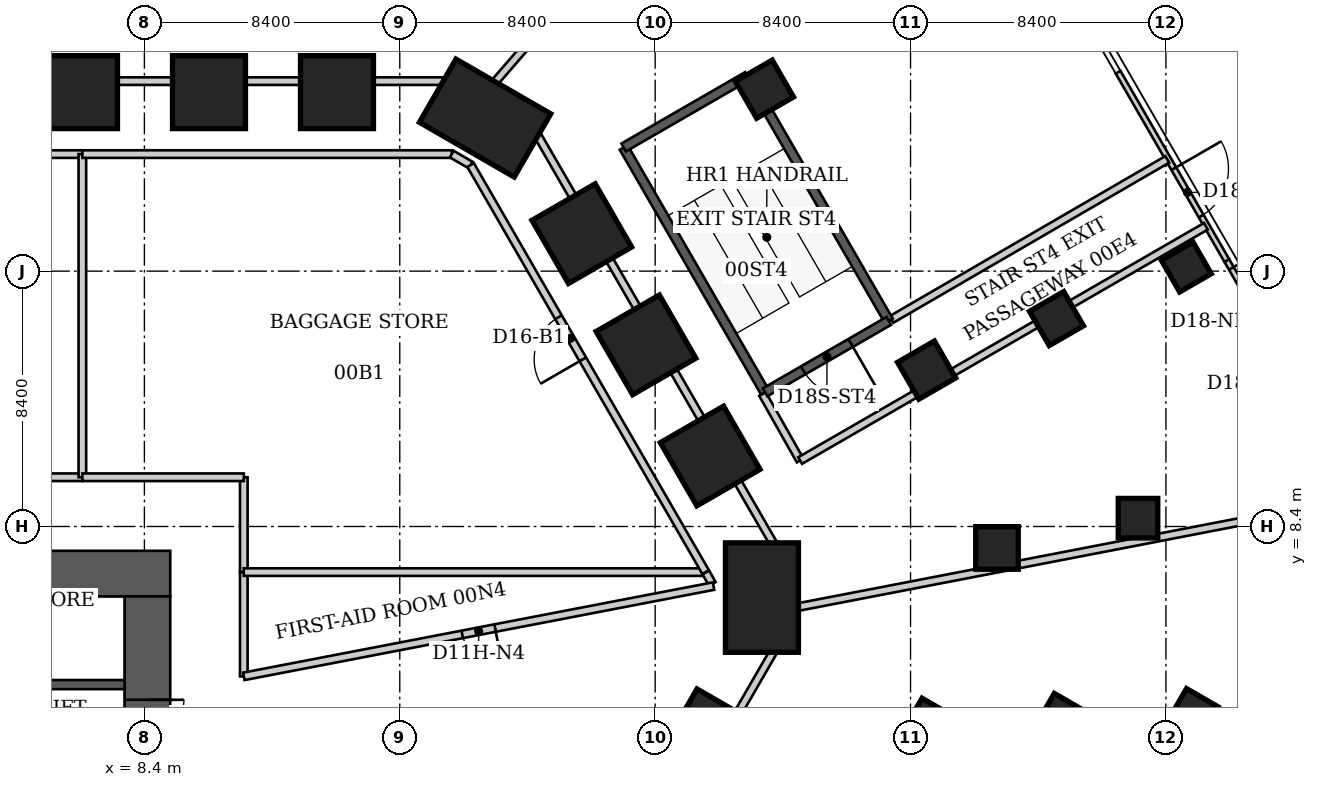
"""IFC4 building model, lengths in metres.
Left out: names, types, materials, properties, quantities, classifications, styles, units other than length and angle.
Written with IfcOpenShell. Run it as: python <this file> out.ifc"""

import sys

from ifc_helpers import new_model, si_unit, direction, frame, frame_2d, origin, origin_2d, place, context, subcontext, project, spatial, rectangle, extrude, element, fill, save


model = new_model("IFC4")
c1 = context("Model", 3, precision=1e-05, world=origin(), true_north=direction((0.0, 1.0)))
c2 = subcontext(c1, "Body", "Model", "MODEL_VIEW")
j1 = project(units=[si_unit("LENGTHUNIT", "METRE"), si_unit("PLANEANGLEUNIT", "RADIAN")], contexts=[c1])
p1 = place(None, origin())
s1 = spatial("IfcSite", under=j1, at=p1, CompositionType="ELEMENT")
p2 = place(p1, origin())
s2 = spatial("IfcBuilding", under=s1, at=p2, CompositionType="ELEMENT")
p3 = place(p2, origin())
s3 = spatial("IfcBuildingStorey", under=s2, at=p3, CompositionType="ELEMENT", Elevation=0.0)
for number, where, z_axis, x_axis in (
    (1, (6.315, 22.689, -0.2), (0.0, 0.0, 1.0), (0.0, 1.0, 0.0)),
    (2, (10.525, 22.689, -0.2), (0.0, 0.0, 1.0), (0.0, 1.0, 0.0)),
    (3, (14.735, 22.689, -0.2), (0.0, 0.0, 1.0), (0.0, 1.0, 0.0)),
):
    element("IfcColumn", number, at=place(p3, frame(where, z_axis=z_axis, x_axis=x_axis)), inside=s3, PredefinedType="COLUMN", context=c2, shape_type="SweptSolid", body=[
        extrude(rectangle(XDim=2.4, YDim=2.4, at=origin_2d()), origin(), (0.0, 0.0, 1.0), 6.2),
    ])
p4 = place(p3, frame((19.606, 21.835, -0.2), z_axis=(0.0, 0.0, 1.0), x_axis=(0.5, 0.866025403784, 0.0)))
e4 = element("IfcColumn", 4, at=p4, inside=s3, PredefinedType="COLUMN", context=c2, shape_type="SweptSolid", body=[
    extrude(rectangle(XDim=2.4, YDim=3.6, at=origin_2d()), origin(), (0.0, 0.0, 1.0), 6.2),
])
for number, where, z_axis, x_axis in (
    (5, (22.788, 18.032, -0.2), (0.0, 0.0, 1.0), (0.866, 0.5, 0.0)),
    (6, (24.899, 14.375, -0.2), (0.0, 0.0, 1.0), (0.866, 0.5, 0.0)),
    (7, (27.01, 10.719, -0.2), (0.0, 0.0, 1.0), (0.866, 0.5, 0.0)),
):
    element("IfcColumn", number, at=place(p3, frame(where, z_axis=z_axis, x_axis=x_axis)), inside=s3, PredefinedType="COLUMN", context=c2, shape_type="SweptSolid", body=[
        extrude(rectangle(XDim=2.4, YDim=2.4, at=origin_2d()), origin(), (0.0, 0.0, 1.0), 6.2),
    ])
p5 = place(p3, frame((28.713, 6.062, -0.2), z_axis=(0.0, 0.0, 1.0), x_axis=(1.0, 0.0, 0.0)))
e8 = element("IfcColumn", 8, at=p5, inside=s3, PredefinedType="COLUMN", context=c2, shape_type="SweptSolid", body=[
    extrude(rectangle(XDim=2.4, YDim=3.6, at=origin_2d()), origin(), (0.0, 0.0, 1.0), 6.2),
])
p6 = place(p3, frame((27.016, 1.416, -0.2), z_axis=(0.0, 0.0, 1.0), x_axis=(0.866025403784, -0.5, 0.0)))
e9 = element("IfcColumn", 9, at=p6, inside=s3, PredefinedType="COLUMN", context=c2, shape_type="SweptSolid", body=[
    extrude(rectangle(XDim=2.4, YDim=2.4, at=origin_2d()), origin(), (0.0, 0.0, 1.0), 6.2),
])
for number, where, z_axis, x_axis in (
    (10, (28.794, 22.785, -0.2), (0.0, 0.0, 1.0), (0.866, 0.5, 0.0)),
    (11, (34.129, 13.544, -0.2), (0.0, 0.0, 1.0), (0.866, 0.5, 0.0)),
    (12, (36.443, 7.694, -0.2), (0.0, 0.0, 1.0), (1.0, 0.0, 0.0)),
    (13, (34.235, 1.795, -0.2), (0.0, 0.0, 1.0), (0.866, -0.5, 0.0)),
):
    element("IfcColumn", number, at=place(p3, frame(where, z_axis=z_axis, x_axis=x_axis)), inside=s3, PredefinedType="COLUMN", context=c2, shape_type="SweptSolid", body=[
        extrude(rectangle(XDim=1.4, YDim=1.4, at=origin_2d()), origin(), (0.0, 0.0, 1.0), 6.2),
    ])
for number, where, z_axis, x_axis in (
    (14, (38.4, 15.239, -0.2), (0.0, 0.0, 1.0), (0.866, 0.5, 0.0)),
    (15, (41.082, 8.674, -0.2), (0.0, 0.0, 1.0), (1.0, 0.0, 0.0)),
    (16, (38.566, 2.022, -0.2), (0.0, 0.0, 1.0), (0.866, -0.5, 0.0)),
):
    element("IfcColumn", number, at=place(p3, frame(where, z_axis=z_axis, x_axis=x_axis)), inside=s3, PredefinedType="COLUMN", context=c2, shape_type="SweptSolid", body=[
        extrude(rectangle(XDim=1.3, YDim=1.3, at=origin_2d()), origin(), (0.0, 0.0, 1.0), 6.2),
    ])
for number, where, z_axis, x_axis in (
    (17, (42.672, 16.934, -0.2), (0.0, 0.0, 1.0), (0.866, 0.5, 0.0)),
    (18, (42.897, 2.249, -0.2), (0.0, 0.0, 1.0), (0.866, -0.5, 0.0)),
):
    element("IfcColumn", number, at=place(p3, frame(where, z_axis=z_axis, x_axis=x_axis)), inside=s3, PredefinedType="COLUMN", context=c2, shape_type="SweptSolid", body=[
        extrude(rectangle(XDim=1.2, YDim=1.2, at=origin_2d()), origin(), (0.0, 0.0, 1.0), 6.2),
    ])
p7 = place(p3, frame((-9.25, 6.85, -0.2), z_axis=(0.0, 0.0, 1.0), x_axis=(1.0, 0.0, 0.0)))
e19 = element("IfcWall", 19, at=p7, inside=s3, PredefinedType="SHEAR", context=c2, shape_type="SweptSolid", body=[
    extrude(rectangle(XDim=18.5, YDim=1.5, at=frame_2d((9.25, 0.0))), origin(), (0.0, 0.0, 1.0), 6.2),
])
p8 = place(p7, frame((2.137, 0.0, 0.2)))
e20 = element("IfcOpeningElement", 20, at=p8, cuts=e19, PredefinedType="OPENING", context=c2, shape_type="SweptSolid", body=[
    extrude(rectangle(XDim=1.1, YDim=2.1, at=frame_2d((0.55, 1.05))), frame((0.0, 0.75, 0.0), z_axis=(0.0, -1.0, 0.0), x_axis=(1.0, 0.0, 0.0)), (0.0, 0.0, 1.0), 1.5),
])
p9 = place(p7, frame((4.762, 0.0, 0.2)))
e21 = element("IfcOpeningElement", 21, at=p9, cuts=e19, PredefinedType="OPENING", context=c2, shape_type="SweptSolid", body=[
    extrude(rectangle(XDim=1.1, YDim=2.1, at=frame_2d((0.55, 1.05))), frame((0.0, 0.75, 0.0), z_axis=(0.0, -1.0, 0.0), x_axis=(1.0, 0.0, 0.0)), (0.0, 0.0, 1.0), 1.5),
])
p10 = place(p3, frame((8.5, -9.2, -0.2), z_axis=(0.0, 0.0, 1.0), x_axis=(0.0, 1.0, 0.0)))
e22 = element("IfcWall", 22, at=p10, inside=s3, PredefinedType="SHEAR", context=c2, shape_type="SweptSolid", body=[
    extrude(rectangle(XDim=15.3, YDim=1.5, at=frame_2d((7.65, 0.0))), origin(), (0.0, 0.0, 1.0), 6.2),
])
p11 = place(p10, frame((10.7, 0.0, 0.2)))
e23 = element("IfcOpeningElement", 23, at=p11, cuts=e22, PredefinedType="OPENING", context=c2, shape_type="SweptSolid", body=[
    extrude(rectangle(XDim=1.2, YDim=2.2, at=frame_2d((0.6, 1.1))), frame((0.0, 0.75, 0.0), z_axis=(0.0, -1.0, 0.0), x_axis=(1.0, 0.0, 0.0)), (0.0, 0.0, 1.0), 1.5),
])
p12 = place(p3, frame((-7.75, 3.2, -0.2), z_axis=(0.0, 0.0, 1.0), x_axis=(1.0, 0.0, 0.0)))
e24 = element("IfcWall", 24, at=p12, inside=s3, PredefinedType="SHEAR", context=c2, shape_type="SweptSolid", body=[
    extrude(rectangle(XDim=15.5, YDim=0.3, at=frame_2d((7.75, 0.0))), origin(), (0.0, 0.0, 1.0), 6.2),
])
p13 = place(p12, frame((9.825, 0.0, 0.2)))
e25 = element("IfcOpeningElement", 25, at=p13, cuts=e24, PredefinedType="OPENING", context=c2, shape_type="SweptSolid", body=[
    extrude(rectangle(XDim=1.1, YDim=2.2, at=frame_2d((0.55, 1.1))), frame((0.0, 0.15, 0.0), z_axis=(0.0, -1.0, 0.0), x_axis=(1.0, 0.0, 0.0)), (0.0, 0.0, 1.0), 0.3),
])
p14 = place(p3, frame((40.428, 23.341, 0.0), z_axis=(0.0, 0.0, 1.0), x_axis=(0.499988249127, -0.866032188048, 0.0)))
e26 = element("IfcWall", 26, at=p14, inside=s3, PredefinedType="SOLIDWALL", context=c2, shape_type="SweptSolid", body=[
    extrude(rectangle(XDim=7.156, YDim=0.18, at=frame_2d((3.578, 0.0))), origin(), (0.0, 0.0, 1.0), 5.84),
])
p15 = place(p14, frame((3.661, 0.0, 0.0)))
e27 = element("IfcOpeningElement", 27, at=p15, cuts=e26, PredefinedType="OPENING", context=c2, shape_type="SweptSolid", body=[
    extrude(rectangle(XDim=1.8, YDim=2.7, at=frame_2d((0.9, 1.35))), frame((0.0, 0.09, 0.0), z_axis=(0.0, -1.0, 0.0), x_axis=(1.0, 0.0, 0.0)), (0.0, 0.0, 1.0), 0.18),
])
p16 = place(p3, frame((44.006, 17.144, 0.0), z_axis=(0.0, 0.0, 1.0), x_axis=(0.500013836808, -0.866017414952, 0.0)))
e28 = element("IfcWall", 28, at=p16, inside=s3, PredefinedType="SOLIDWALL", context=c2, shape_type="SweptSolid", body=[
    extrude(rectangle(XDim=7.156, YDim=0.18, at=frame_2d((3.578, 0.0))), origin(), (0.0, 0.0, 1.0), 5.84),
])
p17 = place(p16, frame((0.293, 0.0, 0.0)))
e29 = element("IfcOpeningElement", 29, at=p17, cuts=e28, PredefinedType="OPENING", context=c2, shape_type="SweptSolid", body=[
    extrude(rectangle(XDim=1.8, YDim=2.7, at=frame_2d((0.9, 1.35))), frame((0.0, 0.09, 0.0), z_axis=(0.0, -1.0, 0.0), x_axis=(1.0, 0.0, 0.0)), (0.0, 0.0, 1.0), 0.18),
])
p18 = place(p16, frame((2.678, 0.0, 0.0)))
e30 = element("IfcOpeningElement", 30, at=p18, cuts=e28, PredefinedType="OPENING", context=c2, shape_type="SweptSolid", body=[
    extrude(rectangle(XDim=1.8, YDim=2.7, at=frame_2d((0.9, 1.35))), frame((0.0, 0.09, 0.0), z_axis=(0.0, -1.0, 0.0), x_axis=(1.0, 0.0, 0.0)), (0.0, 0.0, 1.0), 0.18),
])
p19 = place(p16, frame((5.063, 0.0, 0.0)))
e31 = element("IfcOpeningElement", 31, at=p19, cuts=e28, PredefinedType="OPENING", context=c2, shape_type="SweptSolid", body=[
    extrude(rectangle(XDim=1.8, YDim=2.7, at=frame_2d((0.9, 1.35))), frame((0.0, 0.09, 0.0), z_axis=(0.0, -1.0, 0.0), x_axis=(1.0, 0.0, 0.0)), (0.0, 0.0, 1.0), 0.18),
])
p20 = place(p3, frame((4.0, 20.65, 0.0), z_axis=(0.0, 0.0, 1.0), x_axis=(1.0, 0.0, 0.0)))
e32 = element("IfcWall", 32, at=p20, inside=s3, PredefinedType="PARTITIONING", context=c2, shape_type="SweptSolid", body=[
    extrude(rectangle(XDim=2.36, YDim=0.25, at=frame_2d((1.18, 0.0))), origin(), (0.0, 0.0, 1.0), 5.84),
])
p21 = place(p3, frame((6.36, 10.02, 0.0), z_axis=(0.0, 0.0, 1.0), x_axis=(-1.0, 0.0, 0.0)))
e33 = element("IfcWall", 33, at=p21, inside=s3, PredefinedType="PARTITIONING", context=c2, shape_type="SweptSolid", body=[
    extrude(rectangle(XDim=13.45, YDim=0.25, at=frame_2d((6.725, 0.0))), origin(), (0.0, 0.0, 1.0), 5.84),
])
p22 = place(p3, frame((6.36, 10.02, 0.0), z_axis=(0.0, 0.0, 1.0), x_axis=(0.0, 1.0, 0.0)))
e34 = element("IfcWall", 34, at=p22, inside=s3, PredefinedType="PARTITIONING", context=c2, shape_type="SweptSolid", body=[
    extrude(rectangle(XDim=10.63, YDim=0.25, at=frame_2d((5.315, 0.0))), origin(), (0.0, 0.0, 1.0), 5.078),
])
p23 = place(p3, frame((6.36, 20.65, 0.0), z_axis=(0.0, 0.0, 1.0), x_axis=(1.0, 0.0, 0.0)))
e35 = element("IfcWall", 35, at=p23, inside=s3, PredefinedType="PARTITIONING", context=c2, shape_type="SweptSolid", body=[
    extrude(rectangle(XDim=12.15, YDim=0.25, at=frame_2d((6.075, 0.0))), origin(), (0.0, 0.0, 1.0), 5.84),
])
p24 = place(p3, frame((11.67, 3.47, 0.0), z_axis=(0.0, 0.0, 1.0), x_axis=(0.0, 1.0, 0.0)))
e36 = element("IfcWall", 36, at=p24, inside=s3, PredefinedType="PARTITIONING", context=c2, shape_type="SweptSolid", body=[
    extrude(rectangle(XDim=3.43, YDim=0.25, at=frame_2d((1.715, 0.0))), origin(), (0.0, 0.0, 1.0), 5.84),
])
p25 = place(p3, frame((11.67, 6.9, 0.0), z_axis=(0.0, 0.0, 1.0), x_axis=(0.0, 1.0, 0.0)))
e37 = element("IfcWall", 37, at=p25, inside=s3, PredefinedType="PARTITIONING", context=c2, shape_type="SweptSolid", body=[
    extrude(rectangle(XDim=3.12, YDim=0.25, at=frame_2d((1.56, 0.0))), origin(), (0.0, 0.0, 1.0), 5.84),
])
p26 = place(p3, frame((11.67, 10.02, 0.0), z_axis=(0.0, 0.0, 1.0), x_axis=(-1.0, 0.0, 0.0)))
e38 = element("IfcWall", 38, at=p26, inside=s3, PredefinedType="PARTITIONING", context=c2, shape_type="SweptSolid", body=[
    extrude(rectangle(XDim=5.31, YDim=0.25, at=frame_2d((2.655, 0.0))), origin(), (0.0, 0.0, 1.0), 5.84),
])
p27 = place(p3, frame((18.51, 20.65, 0.0), z_axis=(0.0, 0.0, 1.0), x_axis=(0.864827114446, -0.502069778138, 0.0)))
e39 = element("IfcWall", 39, at=p27, inside=s3, PredefinedType="PARTITIONING", context=c2, shape_type="SweptSolid", body=[
    extrude(rectangle(XDim=0.717, YDim=0.25, at=frame_2d((0.358, 0.0))), origin(), (0.0, 0.0, 1.0), 5.84),
])
p28 = place(p3, frame((19.15, 23.05, 0.0), z_axis=(0.0, 0.0, 1.0), x_axis=(-1.0, 0.0, 0.0)))
e40 = element("IfcWall", 40, at=p28, inside=s3, PredefinedType="PARTITIONING", context=c2, shape_type="SweptSolid", body=[
    extrude(rectangle(XDim=15.15, YDim=0.25, at=frame_2d((7.575, 0.0))), origin(), (0.0, 0.0, 1.0), 4.04),
])
p29 = place(p3, frame((19.15, 23.05, 0.0), z_axis=(0.0, 0.0, 1.0), x_axis=(0.86570107998, -0.500561325036, 0.0)))
e41 = element("IfcWall", 41, at=p29, inside=s3, PredefinedType="PARTITIONING", context=c2, shape_type="SweptSolid", body=[
    extrude(rectangle(XDim=0.588, YDim=0.25, at=frame_2d((0.294, 0.0))), origin(), (0.0, 0.0, 1.0), 5.84),
])
p30 = place(p3, frame((19.69, 22.74, 0.0), z_axis=(0.0, 0.0, 1.0), x_axis=(0.865102050426, -0.501595895466, 0.0)))
e42 = element("IfcWall", 42, at=p30, inside=s3, PredefinedType="PARTITIONING", context=c2, shape_type="SweptSolid", body=[
    extrude(rectangle(XDim=1.375, YDim=0.25, at=frame_2d((0.688, 0.0))), origin(), (0.0, 0.0, 1.0), 5.84),
])
p31 = place(p3, frame((25.06, -2.69, 0.0), z_axis=(0.0, 0.0, 1.0), x_axis=(0.500462066422, 0.865758465204, 0.0)))
e43 = element("IfcWall", 43, at=p31, inside=s3, PredefinedType="PARTITIONING", context=c2, shape_type="SweptSolid", body=[
    extrude(rectangle(XDim=8.952, YDim=0.25, at=frame_2d((4.476, 0.0))), origin(), (0.0, 0.0, 1.0), 4.04),
])
p32 = place(p3, frame((26.85, 6.9, 0.0), z_axis=(0.0, 0.0, 1.0), x_axis=(-1.0, 0.0, 0.0)))
e44 = element("IfcWall", 44, at=p32, inside=s3, PredefinedType="PARTITIONING", context=c2, shape_type="SweptSolid", body=[
    extrude(rectangle(XDim=15.18, YDim=0.25, at=frame_2d((7.59, 0.0))), origin(), (0.0, 0.0, 1.0), 5.84),
])
p33 = place(p3, frame((26.86, 6.9, 0.0), z_axis=(0.0, 0.0, 1.0), x_axis=(-0.499972135205, 0.866041490934, 0.0)))
e45 = element("IfcWall", 45, at=p33, inside=s3, PredefinedType="PARTITIONING", context=c2, shape_type="SweptSolid", body=[
    extrude(rectangle(XDim=15.461, YDim=0.25, at=frame_2d((7.731, 0.0))), origin(), (0.0, 0.0, 1.0), 5.84),
])
p34 = place(p33, frame((8.081, 0.0, 0.0)))
e46 = element("IfcOpeningElement", 46, at=p34, cuts=e45, PredefinedType="OPENING", context=c2, shape_type="SweptSolid", body=[
    extrude(rectangle(XDim=1.6, YDim=2.4, at=frame_2d((0.8, 1.2))), frame((0.0, 0.125, 0.0), z_axis=(0.0, -1.0, 0.0), x_axis=(1.0, 0.0, 0.0)), (0.0, 0.0, 1.0), 0.25),
])
p35 = place(p3, frame((26.867, 6.887, 0.0), z_axis=(0.0, 0.0, 1.0), x_axis=(0.49170458892, -0.870762078432, 0.0)))
e47 = element("IfcWall", 47, at=p35, inside=s3, PredefinedType="PARTITIONING", context=c2, shape_type="SweptSolid", body=[
    extrude(rectangle(XDim=0.433, YDim=0.25, at=frame_2d((0.217, 0.0))), origin(), (0.0, 0.0, 1.0), 5.84),
])
p36 = place(p3, frame((27.12, 6.44, 0.0), z_axis=(0.0, 0.0, 1.0), x_axis=(-0.982020832849, -0.188772571765, 0.0)))
e48 = element("IfcWall", 48, at=p36, inside=s3, PredefinedType="PARTITIONING", context=c2, shape_type="SweptSolid", body=[
    extrude(rectangle(XDim=15.733, YDim=0.25, at=frame_2d((7.867, 0.0))), origin(), (0.0, 0.0, 1.0), 5.84),
])
p37 = place(p36, frame((7.316, 0.0, 0.0)))
e49 = element("IfcOpeningElement", 49, at=p37, cuts=e48, PredefinedType="OPENING", context=c2, shape_type="SweptSolid", body=[
    extrude(rectangle(XDim=1.1, YDim=2.2, at=frame_2d((0.55, 1.1))), frame((0.0, 0.125, 0.0), z_axis=(0.0, -1.0, 0.0), x_axis=(1.0, 0.0, 0.0)), (0.0, 0.0, 1.0), 0.25),
])
p38 = place(p3, frame((28.73, 12.76, 0.0), z_axis=(0.0, 0.0, 1.0), x_axis=(0.492718818431, -0.87018858069, 0.0)))
e50 = element("IfcWall", 50, at=p38, inside=s3, PredefinedType="PARTITIONING", context=c2, shape_type="SweptSolid", body=[
    extrude(rectangle(XDim=2.517, YDim=0.25, at=frame_2d((1.258, 0.0))), origin(), (0.0, 0.0, 1.0), 5.84),
])
p39 = place(p3, frame((29.54, 5.06, 0.0), z_axis=(0.0, 0.0, 1.0), x_axis=(0.0, 1.0, 0.0)))
e51 = element("IfcWall", 51, at=p39, inside=s3, PredefinedType="PARTITIONING", context=c2, shape_type="SweptSolid", body=[
    extrude(rectangle(XDim=0.585, YDim=0.25, at=frame_2d((0.292, 0.0))), origin(), (0.0, 0.0, 1.0), 5.84),
])
p40 = place(p3, frame((29.54, 5.68, 0.0), z_axis=(0.0, 0.0, 1.0), x_axis=(0.0, 1.0, 0.0)))
e52 = element("IfcWall", 52, at=p40, inside=s3, PredefinedType="PARTITIONING", context=c2, shape_type="SweptSolid", body=[
    extrude(rectangle(XDim=1.38, YDim=0.25, at=frame_2d((0.69, 0.0))), origin(), (0.0, 0.0, 1.0), 5.84),
])
p41 = place(p3, frame((29.54, 7.06, 0.0), z_axis=(0.0, 0.0, 1.0), x_axis=(-0.500235539918, 0.865889372035, 0.0)))
e53 = element("IfcWall", 53, at=p41, inside=s3, PredefinedType="PARTITIONING", context=c2, shape_type="SweptSolid", body=[
    extrude(rectangle(XDim=17.312, YDim=0.25, at=frame_2d((8.656, 0.0))), origin(), (0.0, 0.0, 1.0), 4.04),
])
p42 = place(p3, frame((29.97, 10.57, 0.0), z_axis=(0.0, 0.0, 1.0), x_axis=(0.866006423824, 0.500032872815, 0.0)))
e54 = element("IfcWall", 54, at=p42, inside=s3, PredefinedType="PARTITIONING", context=c2, shape_type="SweptSolid", body=[
    extrude(rectangle(XDim=15.409, YDim=0.25, at=frame_2d((7.704, 0.0))), origin(), (0.0, 0.0, 1.0), 5.083),
])
p43 = place(p3, frame((31.73, 36.647, 0.0), z_axis=(0.0, 0.0, 1.0), x_axis=(-0.654545432473, -0.75602266952, 0.0)))
e55 = element("IfcWall", 55, at=p43, inside=s3, PredefinedType="PARTITIONING", context=c2, shape_type="SweptSolid", body=[
    extrude(rectangle(XDim=18.395, YDim=0.25, at=frame_2d((9.198, 0.0))), origin(), (0.0, 0.0, 1.0), 5.75),
])
p44 = place(p43, frame((8.398, 0.0, 0.0)))
e56 = element("IfcOpeningElement", 56, at=p44, cuts=e55, PredefinedType="OPENING", context=c2, shape_type="SweptSolid", body=[
    extrude(rectangle(XDim=1.6, YDim=2.4, at=frame_2d((0.8, 1.2))), frame((0.0, 0.125, 0.0), z_axis=(0.0, -1.0, 0.0), x_axis=(1.0, 0.0, 0.0)), (0.0, 0.0, 1.0), 0.25),
])
p45 = place(p3, frame((42.044, 20.475, 0.0), z_axis=(0.0, 0.0, 1.0), x_axis=(-0.864887716018, -0.501965375978, 0.0)))
e57 = element("IfcWall", 57, at=p45, inside=s3, PredefinedType="PARTITIONING", context=c2, shape_type="SweptSolid", body=[
    extrude(rectangle(XDim=10.49, YDim=0.25, at=frame_2d((5.245, 0.0))), origin(), (0.0, 0.0, 1.0), 5.75),
])
p46 = place(p3, frame((47.601, 9.164, 0.0), z_axis=(0.0, 0.0, 1.0), x_axis=(-0.981893421599, -0.189434180181, 0.0)))
e58 = element("IfcWall", 58, at=p46, inside=s3, PredefinedType="PARTITIONING", context=c2, shape_type="SweptSolid", body=[
    extrude(rectangle(XDim=18.394, YDim=0.25, at=frame_2d((9.197, 0.0))), origin(), (0.0, 0.0, 1.0), 5.75),
])
p47 = place(p3, frame((28.815, 12.813, 0.0), z_axis=(0.0, 0.0, 1.0), x_axis=(-0.500015592816, 0.866016401081, 0.0)))
e59 = element("IfcWall", 59, at=p47, inside=s3, PredefinedType="SHEAR", context=c2, shape_type="SweptSolid", body=[
    extrude(rectangle(XDim=9.3, YDim=0.3, at=frame_2d((4.65, 0.0))), origin(), (0.0, 0.0, 1.0), 6.0),
])
p48 = place(p3, frame((24.165, 20.867, 0.0), z_axis=(0.0, 0.0, 1.0), x_axis=(0.866016039709, 0.500016218704, 0.0)))
e60 = element("IfcWall", 60, at=p48, inside=s3, PredefinedType="SHEAR", context=c2, shape_type="SweptSolid", body=[
    extrude(rectangle(XDim=4.7, YDim=0.3, at=frame_2d((2.35, 0.0))), origin(), (0.0, 0.0, 1.0), 6.0),
])
p49 = place(p3, frame((28.235, 23.217, 0.0), z_axis=(0.0, 0.0, 1.0), x_axis=(0.500004225487, -0.866022964185, 0.0)))
e61 = element("IfcWall", 61, at=p49, inside=s3, PredefinedType="SHEAR", context=c2, shape_type="SweptSolid", body=[
    extrude(rectangle(XDim=9.3, YDim=0.3, at=frame_2d((4.65, 0.0))), origin(), (0.0, 0.0, 1.0), 6.0),
])
p50 = place(p3, frame((32.885, 15.163, 0.0), z_axis=(0.0, 0.0, 1.0), x_axis=(-0.866038532462, -0.499977259774, 0.0)))
e62 = element("IfcWall", 62, at=p50, inside=s3, PredefinedType="SHEAR", context=c2, shape_type="SweptSolid", body=[
    extrude(rectangle(XDim=4.7, YDim=0.3, at=frame_2d((2.35, 0.0))), origin(), (0.0, 0.0, 1.0), 6.0),
])
p51 = place(p50, frame((1.45, 0.0, 0.0)))
e63 = element("IfcOpeningElement", 63, at=p51, cuts=e62, PredefinedType="OPENING", context=c2, shape_type="SweptSolid", body=[
    extrude(rectangle(XDim=1.8, YDim=2.4, at=frame_2d((0.9, 1.2))), frame((0.0, 0.15, 0.0), z_axis=(0.0, -1.0, 0.0), x_axis=(1.0, 0.0, 0.0)), (0.0, 0.0, 1.0), 0.3),
])
p52 = place(p15, origin())
e64 = element("IfcDoor", 64, at=p52, inside=s3, OperationType="SINGLE_SWING_LEFT", PredefinedType="DOOR", context=c2, shape_type="SweptSolid", body=[
    extrude(rectangle(XDim=1.8, YDim=2.7, at=frame_2d((0.9, 1.35))), frame((0.0, 0.025, 0.0), z_axis=(0.0, -1.0, 0.0), x_axis=(1.0, 0.0, 0.0)), (0.0, 0.0, 1.0), 0.05),
])
fill(e27, e64)
p53 = place(p17, origin())
e65 = element("IfcDoor", 65, at=p53, inside=s3, OperationType="SINGLE_SWING_LEFT", PredefinedType="DOOR", context=c2, shape_type="SweptSolid", body=[
    extrude(rectangle(XDim=1.8, YDim=2.7, at=frame_2d((0.9, 1.35))), frame((0.0, 0.025, 0.0), z_axis=(0.0, -1.0, 0.0), x_axis=(1.0, 0.0, 0.0)), (0.0, 0.0, 1.0), 0.05),
])
fill(e29, e65)
p54 = place(p34, origin())
e66 = element("IfcDoor", 66, at=p54, inside=s3, OperationType="DOUBLE_DOOR_SINGLE_SWING", PredefinedType="DOOR", context=c2, shape_type="SweptSolid", body=[
    extrude(rectangle(XDim=1.6, YDim=2.4, at=frame_2d((0.8, 1.2))), frame((0.0, 0.025, 0.0), z_axis=(0.0, -1.0, 0.0), x_axis=(1.0, 0.0, 0.0)), (0.0, 0.0, 1.0), 0.05),
])
fill(e46, e66)
p55 = place(p37, origin())
e67 = element("IfcDoor", 67, at=p55, inside=s3, OperationType="SINGLE_SWING_LEFT", PredefinedType="DOOR", context=c2, shape_type="SweptSolid", body=[
    extrude(rectangle(XDim=1.1, YDim=2.2, at=frame_2d((0.55, 1.1))), frame((0.0, 0.025, 0.0), z_axis=(0.0, -1.0, 0.0), x_axis=(1.0, 0.0, 0.0)), (0.0, 0.0, 1.0), 0.05),
])
fill(e49, e67)
p56 = place(p11, origin())
e68 = element("IfcDoor", 68, at=p56, inside=s3, OperationType="SINGLE_SWING_RIGHT", PredefinedType="DOOR", context=c2, shape_type="SweptSolid", body=[
    extrude(rectangle(XDim=1.2, YDim=2.2, at=frame_2d((0.6, 1.1))), frame((0.0, 0.025, 0.0), z_axis=(0.0, -1.0, 0.0), x_axis=(1.0, 0.0, 0.0)), (0.0, 0.0, 1.0), 0.05),
])
fill(e23, e68)
p57 = place(p51, origin())
e69 = element("IfcDoor", 69, at=p57, inside=s3, OperationType="DOUBLE_DOOR_SINGLE_SWING", PredefinedType="DOOR", context=c2, shape_type="SweptSolid", body=[
    extrude(rectangle(XDim=1.8, YDim=2.4, at=frame_2d((0.9, 1.2))), frame((0.0, 0.025, 0.0), z_axis=(0.0, -1.0, 0.0), x_axis=(1.0, 0.0, 0.0)), (0.0, 0.0, 1.0), 0.05),
])
fill(e63, e69)
save(model, sys.argv[1])
